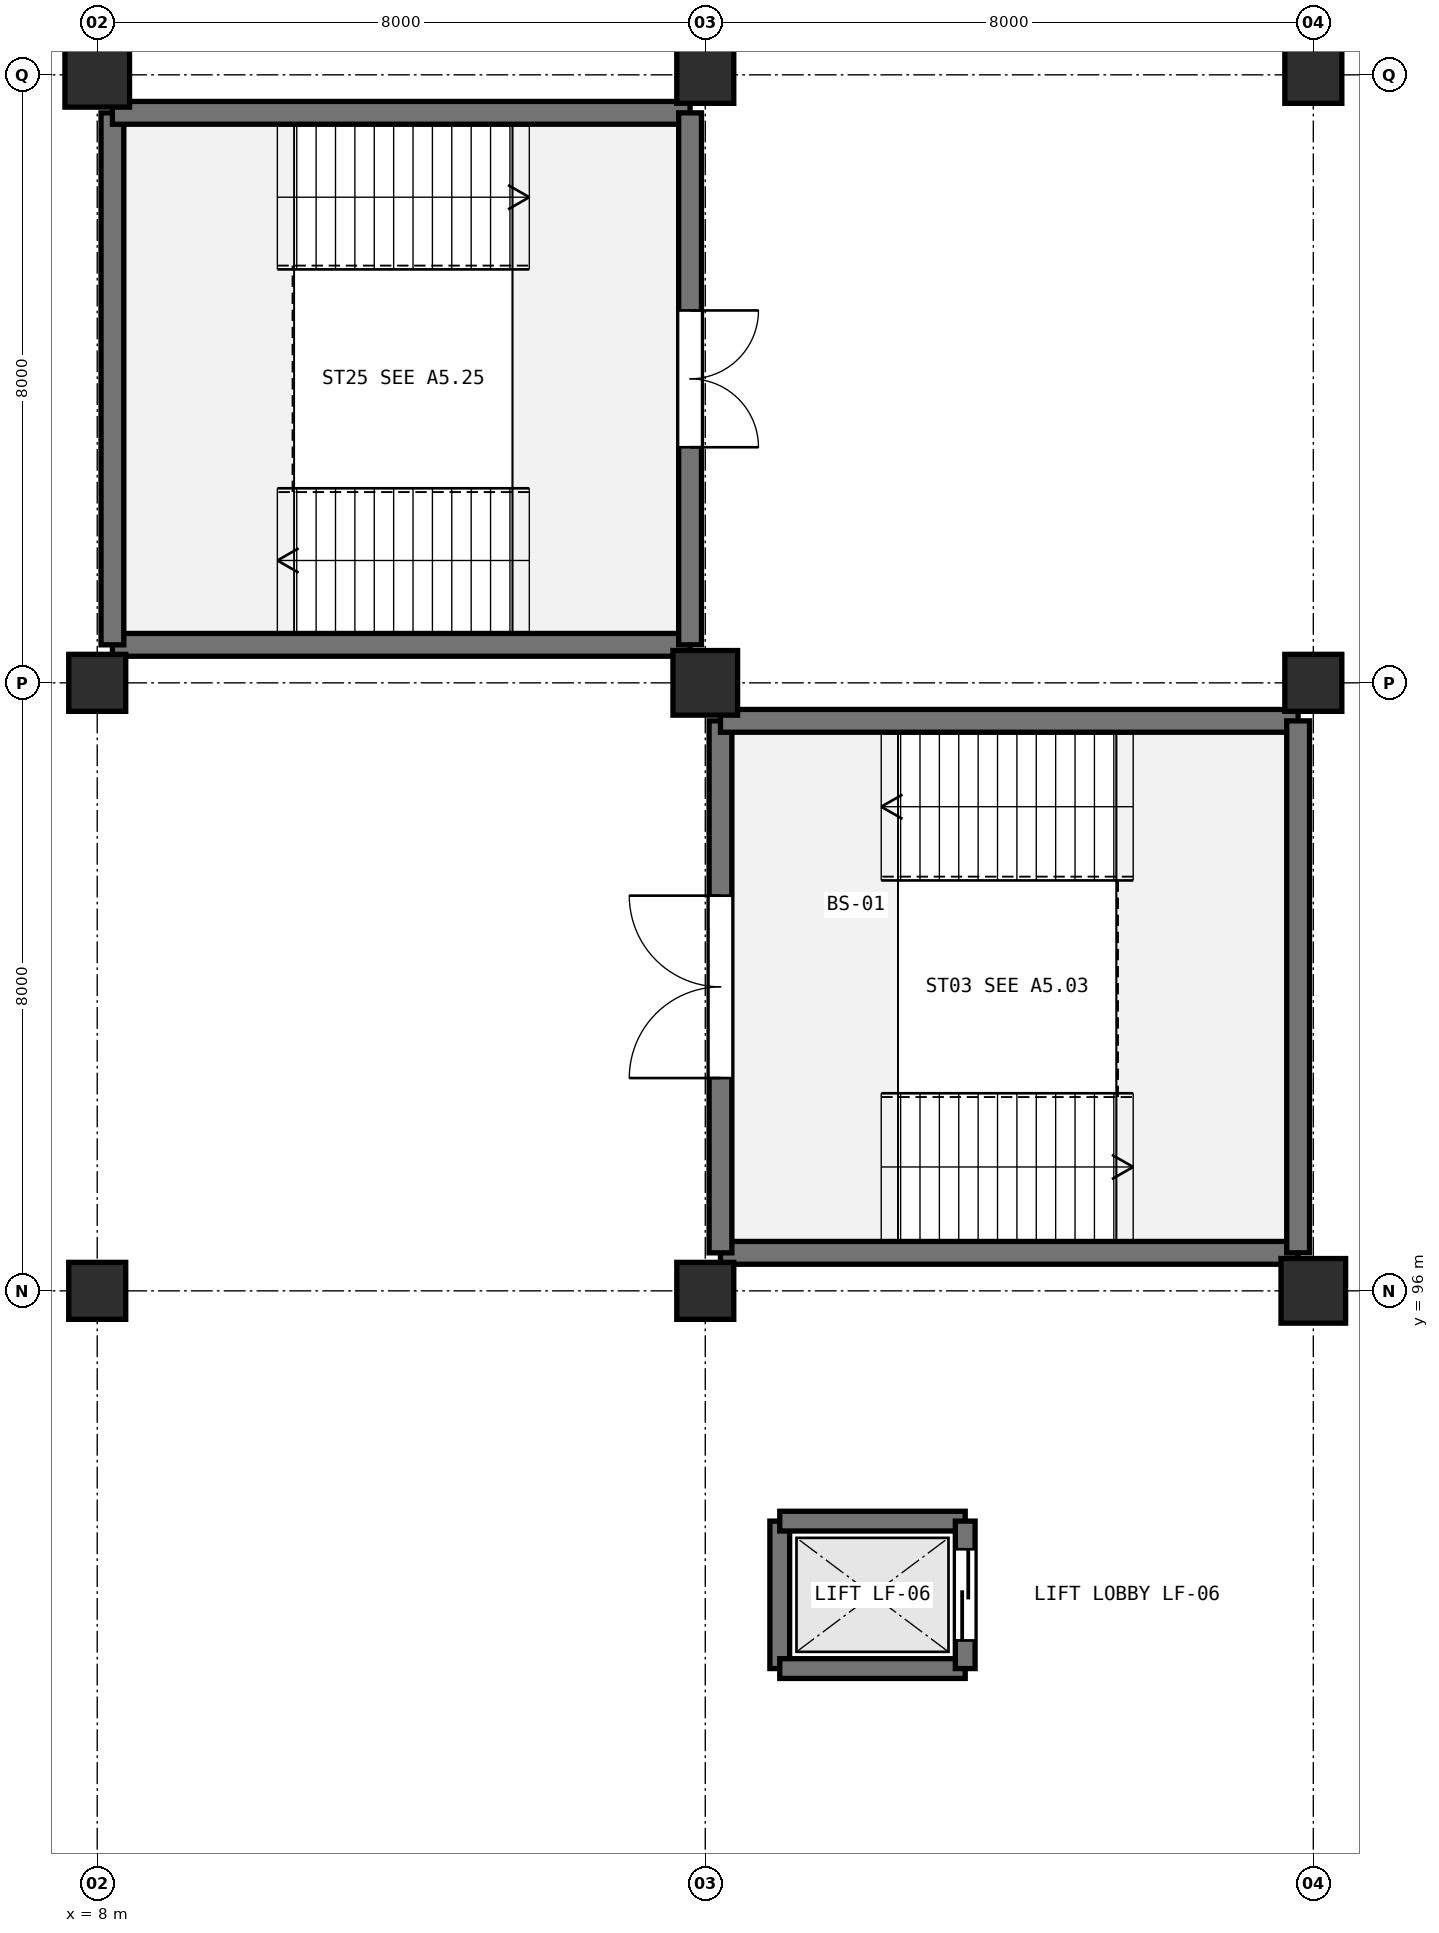
"""IFC4 building model, lengths in metres.
Left out: names, types, materials, properties, quantities, classifications, styles, units other than length and angle.
Written with IfcOpenShell. Run it as: python <this file> out.ifc"""

import sys

from ifc_helpers import new_model, si_unit, direction, frame, frame_2d, origin, origin_2d, place, context, subcontext, project, spatial, rectangle, extrude, element, fill, save


model = new_model("IFC4")
c1 = context("Model", 3, precision=1e-05, world=origin(), true_north=direction((0.0, 1.0)))
c2 = subcontext(c1, "Body", "Model", "MODEL_VIEW")
j1 = project(units=[si_unit("LENGTHUNIT", "METRE"), si_unit("PLANEANGLEUNIT", "RADIAN")], contexts=[c1])
p1 = place(None, origin())
s1 = spatial("IfcSite", under=j1, at=p1, CompositionType="ELEMENT")
p2 = place(p1, origin())
s2 = spatial("IfcBuilding", under=s1, at=p2, CompositionType="ELEMENT")
p3 = place(p2, frame((0.0, 0.0, -4.8)))
s3 = spatial("IfcBuildingStorey", under=s2, at=p3, CompositionType="ELEMENT", Elevation=-4.8)
for number, where, z_axis, x_axis in (
    (1, (8.0, 96.0, 0.0), (0.0, 0.0, 1.0), (1.0, 0.0, 0.0)),
    (2, (8.0, 104.0, 0.0), (0.0, 0.0, 1.0), (1.0, 0.0, 0.0)),
):
    element("IfcColumn", number, at=place(p3, frame(where, z_axis=z_axis, x_axis=x_axis)), inside=s3, PredefinedType="COLUMN", context=c2, shape_type="SweptSolid", body=[
        extrude(rectangle(XDim=0.75, YDim=0.75, at=origin_2d()), origin(), (0.0, 0.0, 1.0), 4.8),
    ])
p4 = place(p3, frame((8.0, 112.0, 0.0), z_axis=(0.0, 0.0, 1.0), x_axis=(1.0, 0.0, 0.0)))
e3 = element("IfcColumn", 3, at=p4, inside=s3, PredefinedType="COLUMN", context=c2, shape_type="SweptSolid", body=[
    extrude(rectangle(XDim=0.85, YDim=0.85, at=origin_2d()), origin(), (0.0, 0.0, 1.0), 4.8),
])
p5 = place(p3, frame((16.0, 96.0, 0.0), z_axis=(0.0, 0.0, 1.0), x_axis=(1.0, 0.0, 0.0)))
e4 = element("IfcColumn", 4, at=p5, inside=s3, PredefinedType="COLUMN", context=c2, shape_type="SweptSolid", body=[
    extrude(rectangle(XDim=0.75, YDim=0.75, at=origin_2d()), origin(), (0.0, 0.0, 1.0), 4.8),
])
p6 = place(p3, frame((16.0, 104.0, 0.0), z_axis=(0.0, 0.0, 1.0), x_axis=(1.0, 0.0, 0.0)))
e5 = element("IfcColumn", 5, at=p6, inside=s3, PredefinedType="COLUMN", context=c2, shape_type="SweptSolid", body=[
    extrude(rectangle(XDim=0.85, YDim=0.85, at=origin_2d()), origin(), (0.0, 0.0, 1.0), 4.8),
])
p7 = place(p3, frame((16.0, 112.0, 0.0), z_axis=(0.0, 0.0, 1.0), x_axis=(1.0, 0.0, 0.0)))
e6 = element("IfcColumn", 6, at=p7, inside=s3, PredefinedType="COLUMN", context=c2, shape_type="SweptSolid", body=[
    extrude(rectangle(XDim=0.75, YDim=0.75, at=origin_2d()), origin(), (0.0, 0.0, 1.0), 4.8),
])
p8 = place(p3, frame((24.0, 96.0, 0.0), z_axis=(0.0, 0.0, 1.0), x_axis=(1.0, 0.0, 0.0)))
e7 = element("IfcColumn", 7, at=p8, inside=s3, PredefinedType="COLUMN", context=c2, shape_type="SweptSolid", body=[
    extrude(rectangle(XDim=0.85, YDim=0.85, at=origin_2d()), origin(), (0.0, 0.0, 1.0), 4.8),
])
for number, where, z_axis, x_axis in (
    (8, (24.0, 104.0, 0.0), (0.0, 0.0, 1.0), (1.0, 0.0, 0.0)),
    (9, (24.0, 112.0, 0.0), (0.0, 0.0, 1.0), (1.0, 0.0, 0.0)),
):
    element("IfcColumn", number, at=place(p3, frame(where, z_axis=z_axis, x_axis=x_axis)), inside=s3, PredefinedType="COLUMN", context=c2, shape_type="SweptSolid", body=[
        extrude(rectangle(XDim=0.75, YDim=0.75, at=origin_2d()), origin(), (0.0, 0.0, 1.0), 4.8),
    ])
p9 = place(p3, frame((23.8, 96.5, 0.0), z_axis=(0.0, 0.0, 1.0), x_axis=(-1.0, 0.0, 0.0)))
e10 = element("IfcWall", 10, at=p9, inside=s3, PredefinedType="SHEAR", context=c2, shape_type="SweptSolid", body=[
    extrude(rectangle(XDim=7.6, YDim=0.3, at=frame_2d((3.8, 0.0))), origin(), (0.0, 0.0, 1.0), 4.46),
])
p10 = place(p3, frame((16.2, 96.5, 0.0), z_axis=(0.0, 0.0, 1.0), x_axis=(0.0, 1.0, 0.0)))
e11 = element("IfcWall", 11, at=p10, inside=s3, PredefinedType="SHEAR", context=c2, shape_type="SweptSolid", body=[
    extrude(rectangle(XDim=7.0, YDim=0.3, at=frame_2d((3.5, 0.0))), origin(), (0.0, 0.0, 1.0), 4.46),
])
p11 = place(p10, frame((2.3, 0.0, 0.0)))
e12 = element("IfcOpeningElement", 12, at=p11, cuts=e11, PredefinedType="OPENING", context=c2, shape_type="SweptSolid", body=[
    extrude(rectangle(XDim=2.4, YDim=2.2, at=frame_2d((1.2, 1.1))), frame((0.0, 0.16, 0.0), z_axis=(0.0, -1.0, 0.0), x_axis=(1.0, 0.0, 0.0)), (0.0, 0.0, 1.0), 0.32),
])
p12 = place(p3, frame((16.2, 103.5, 0.0), z_axis=(0.0, 0.0, 1.0), x_axis=(1.0, 0.0, 0.0)))
e13 = element("IfcWall", 13, at=p12, inside=s3, PredefinedType="SHEAR", context=c2, shape_type="SweptSolid", body=[
    extrude(rectangle(XDim=7.6, YDim=0.3, at=frame_2d((3.8, 0.0))), origin(), (0.0, 0.0, 1.0), 4.46),
])
p13 = place(p3, frame((23.8, 103.5, 0.0), z_axis=(0.0, 0.0, 1.0), x_axis=(0.0, -1.0, 0.0)))
e14 = element("IfcWall", 14, at=p13, inside=s3, PredefinedType="SHEAR", context=c2, shape_type="SweptSolid", body=[
    extrude(rectangle(XDim=7.0, YDim=0.3, at=frame_2d((3.5, 0.0))), origin(), (0.0, 0.0, 1.0), 4.46),
])
p14 = place(p3, frame((15.8, 104.5, 0.0), z_axis=(0.0, 0.0, 1.0), x_axis=(-1.0, 0.0, 0.0)))
e15 = element("IfcWall", 15, at=p14, inside=s3, PredefinedType="SHEAR", context=c2, shape_type="SweptSolid", body=[
    extrude(rectangle(XDim=7.6, YDim=0.3, at=frame_2d((3.8, 0.0))), origin(), (0.0, 0.0, 1.0), 4.46),
])
p15 = place(p3, frame((8.2, 104.5, 0.0), z_axis=(0.0, 0.0, 1.0), x_axis=(0.0, 1.0, 0.0)))
e16 = element("IfcWall", 16, at=p15, inside=s3, PredefinedType="SHEAR", context=c2, shape_type="SweptSolid", body=[
    extrude(rectangle(XDim=7.0, YDim=0.3, at=frame_2d((3.5, 0.0))), origin(), (0.0, 0.0, 1.0), 4.46),
])
p16 = place(p3, frame((8.2, 111.5, 0.0), z_axis=(0.0, 0.0, 1.0), x_axis=(1.0, 0.0, 0.0)))
e17 = element("IfcWall", 17, at=p16, inside=s3, PredefinedType="SHEAR", context=c2, shape_type="SweptSolid", body=[
    extrude(rectangle(XDim=7.6, YDim=0.3, at=frame_2d((3.8, 0.0))), origin(), (0.0, 0.0, 1.0), 4.46),
])
p17 = place(p3, frame((15.8, 111.5, 0.0), z_axis=(0.0, 0.0, 1.0), x_axis=(0.0, -1.0, 0.0)))
e18 = element("IfcWall", 18, at=p17, inside=s3, PredefinedType="SHEAR", context=c2, shape_type="SweptSolid", body=[
    extrude(rectangle(XDim=7.0, YDim=0.3, at=frame_2d((3.5, 0.0))), origin(), (0.0, 0.0, 1.0), 4.46),
])
p18 = place(p17, frame((2.6, 0.0, 0.0)))
e19 = element("IfcOpeningElement", 19, at=p18, cuts=e18, PredefinedType="OPENING", context=c2, shape_type="SweptSolid", body=[
    extrude(rectangle(XDim=1.8, YDim=2.2, at=frame_2d((0.9, 1.1))), frame((0.0, 0.16, 0.0), z_axis=(0.0, -1.0, 0.0), x_axis=(1.0, 0.0, 0.0)), (0.0, 0.0, 1.0), 0.32),
])
p19 = place(p3, frame((16.98, 91.03, 0.0), z_axis=(0.0, 0.0, 1.0), x_axis=(0.0, 1.0, 0.0)))
e20 = element("IfcWall", 20, at=p19, inside=s3, PredefinedType="SHEAR", context=c2, shape_type="SweptSolid", body=[
    extrude(rectangle(XDim=1.94, YDim=0.26, at=frame_2d((0.97, 0.0))), origin(), (0.0, 0.0, 1.0), 4.46),
])
for number, where, z_axis, x_axis in (
    (21, (16.98, 92.97, 0.0), (0.0, 0.0, 1.0), (1.0, 0.0, 0.0)),
    (22, (19.42, 91.03, 0.0), (0.0, 0.0, 1.0), (-1.0, 0.0, 0.0)),
):
    element("IfcWall", number, at=place(p3, frame(where, z_axis=z_axis, x_axis=x_axis)), inside=s3, PredefinedType="SHEAR", context=c2, shape_type="SweptSolid", body=[
        extrude(rectangle(XDim=2.44, YDim=0.26, at=frame_2d((1.22, 0.0))), origin(), (0.0, 0.0, 1.0), 4.46),
    ])
p20 = place(p3, frame((19.42, 92.97, 0.0), z_axis=(0.0, 0.0, 1.0), x_axis=(0.0, -1.0, 0.0)))
e23 = element("IfcWall", 23, at=p20, inside=s3, PredefinedType="SHEAR", context=c2, shape_type="SweptSolid", body=[
    extrude(rectangle(XDim=1.94, YDim=0.26, at=frame_2d((0.97, 0.0))), origin(), (0.0, 0.0, 1.0), 4.46),
])
p21 = place(p20, frame((0.37, 0.0, 0.0)))
e24 = element("IfcOpeningElement", 24, at=p21, cuts=e23, PredefinedType="OPENING", context=c2, shape_type="SweptSolid", body=[
    extrude(rectangle(XDim=1.2, YDim=2.15, at=frame_2d((0.6, 1.075))), frame((0.0, 0.14, 0.0), z_axis=(0.0, -1.0, 0.0), x_axis=(1.0, 0.0, 0.0)), (0.0, 0.0, 1.0), 0.28),
])
p22 = place(p11, frame((2.4, 0.0, 0.0), z_axis=(0.0, 0.0, 1.0), x_axis=(-1.0, 0.0, 0.0)))
e25 = element("IfcDoor", 25, at=p22, inside=s3, OperationType="DOUBLE_DOOR_SINGLE_SWING", PredefinedType="DOOR", context=c2, shape_type="SweptSolid", body=[
    extrude(rectangle(XDim=2.4, YDim=2.2, at=frame_2d((1.2, 1.1))), frame((0.0, 0.025, 0.0), z_axis=(0.0, -1.0, 0.0), x_axis=(1.0, 0.0, 0.0)), (0.0, 0.0, 1.0), 0.05),
])
fill(e12, e25)
p23 = place(p18, frame((1.8, 0.0, 0.0), z_axis=(0.0, 0.0, 1.0), x_axis=(-1.0, 0.0, 0.0)))
e26 = element("IfcDoor", 26, at=p23, inside=s3, OperationType="DOUBLE_DOOR_SINGLE_SWING", PredefinedType="DOOR", context=c2, shape_type="SweptSolid", body=[
    extrude(rectangle(XDim=1.8, YDim=2.2, at=frame_2d((0.9, 1.1))), frame((0.0, 0.025, 0.0), z_axis=(0.0, -1.0, 0.0), x_axis=(1.0, 0.0, 0.0)), (0.0, 0.0, 1.0), 0.05),
])
fill(e19, e26)
p24 = place(p21, origin())
e27 = element("IfcDoor", 27, at=p24, inside=s3, OperationType="SLIDING_TO_LEFT", PredefinedType="DOOR", context=c2, shape_type="SweptSolid", body=[
    extrude(rectangle(XDim=1.2, YDim=2.15, at=frame_2d((0.6, 1.075))), frame((0.0, 0.025, 0.0), z_axis=(0.0, -1.0, 0.0), x_axis=(1.0, 0.0, 0.0)), (0.0, 0.0, 1.0), 0.05),
])
fill(e24, e27)
save(model, sys.argv[1])
